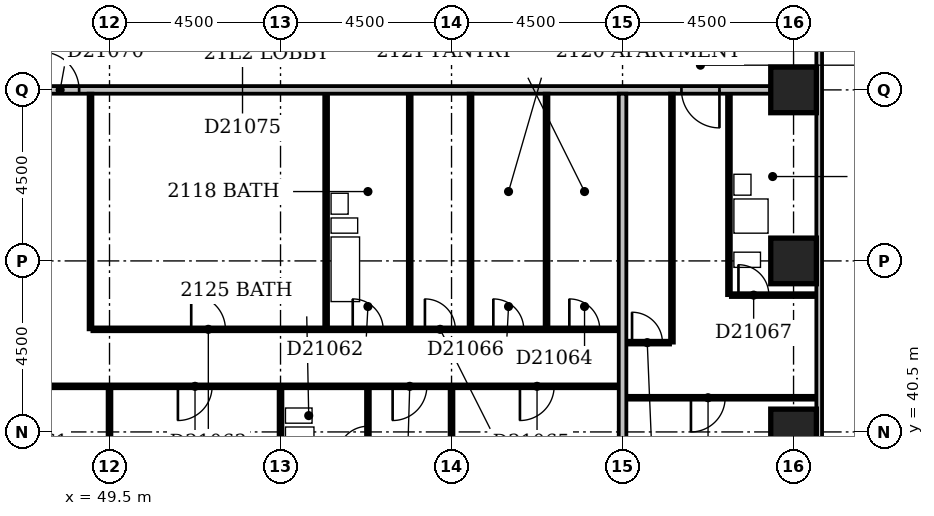
"""IFC4 building model, lengths in metres.
Left out: names, types, materials, properties, quantities, classifications, styles, units other than length and angle.
Written with IfcOpenShell. Run it as: python <this file> out.ifc"""

import sys

from ifc_helpers import new_model, si_unit, direction, frame, frame_2d, origin, origin_2d, place, context, subcontext, project, spatial, rectangle, extrude, element, fill, save


model = new_model("IFC4")
c1 = context("Model", 3, precision=1e-05, world=origin(), true_north=direction((0.0, 1.0)))
c2 = subcontext(c1, "Body", "Model", "MODEL_VIEW")
j1 = project(units=[si_unit("LENGTHUNIT", "METRE"), si_unit("PLANEANGLEUNIT", "RADIAN")], contexts=[c1])
p1 = place(None, origin())
s1 = spatial("IfcSite", under=j1, at=p1, CompositionType="ELEMENT")
p2 = place(p1, origin())
s2 = spatial("IfcBuilding", under=s1, at=p2, CompositionType="ELEMENT")
p3 = place(p2, frame((0.0, 0.0, 86.6)))
s3 = spatial("IfcBuildingStorey", under=s2, at=p3, CompositionType="ELEMENT", Elevation=86.6)
for number, where, z_axis, x_axis in (
    (1, (67.5, 40.5, -0.3), (0.0, 0.0, 1.0), (1.0, 0.0, 0.0)),
    (2, (67.5, 45.0, -0.3), (0.0, 0.0, 1.0), (1.0, 0.0, 0.0)),
    (3, (67.5, 49.5, -0.3), (0.0, 0.0, 1.0), (1.0, 0.0, 0.0)),
):
    element("IfcColumn", number, at=place(p3, frame(where, z_axis=z_axis, x_axis=x_axis)), inside=s3, PredefinedType="COLUMN", context=c2, shape_type="SweptSolid", body=[
        extrude(rectangle(XDim=1.2, YDim=1.2, at=origin_2d()), origin(), (0.0, 0.0, 1.0), 3.6),
    ])
p4 = place(p3, frame((68.175, 35.4, 0.0), z_axis=(0.0, 0.0, 1.0), x_axis=(0.0, 1.0, 0.0)))
e4 = element("IfcWall", 4, at=p4, inside=s3, PredefinedType="STANDARD", context=c2, shape_type="SweptSolid", body=[
    extrude(rectangle(XDim=23.85, YDim=0.15, at=frame_2d((11.925, 0.0))), origin(), (0.0, 0.0, 1.0), 2.7),
])
p5 = place(p4, frame((1.403, 0.0, 0.6)))
e5 = element("IfcOpeningElement", 5, at=p5, cuts=e4, PredefinedType="OPENING", context=c2, shape_type="SweptSolid", body=[
    extrude(rectangle(XDim=1.5, YDim=1.8, at=frame_2d((0.75, 0.9))), frame((0.0, 0.087, 0.0), z_axis=(0.0, -1.0, 0.0), x_axis=(1.0, 0.0, 0.0)), (0.0, 0.0, 1.0), 0.174),
])
p6 = place(p3, frame((49.5, 36.6, 0.0), z_axis=(0.0, 0.0, 1.0), x_axis=(0.0, 1.0, 0.0)))
e6 = element("IfcWall", 6, at=p6, inside=s3, PredefinedType="PARTITIONING", context=c2, shape_type="SweptSolid", body=[
    extrude(rectangle(XDim=5.05, YDim=0.1, at=frame_2d((2.525, 0.0))), origin(), (0.0, 0.0, 1.0), 3.3),
])
p7 = place(p3, frame((54.0, 36.6, 0.0), z_axis=(0.0, 0.0, 1.0), x_axis=(0.0, 1.0, 0.0)))
e7 = element("IfcWall", 7, at=p7, inside=s3, PredefinedType="PARTITIONING", context=c2, shape_type="SweptSolid", body=[
    extrude(rectangle(XDim=5.05, YDim=0.1, at=frame_2d((2.525, 0.0))), origin(), (0.0, 0.0, 1.0), 2.6),
])
p8 = place(p3, frame((58.5, 36.6, 0.0), z_axis=(0.0, 0.0, 1.0), x_axis=(0.0, 1.0, 0.0)))
e8 = element("IfcWall", 8, at=p8, inside=s3, PredefinedType="PARTITIONING", context=c2, shape_type="SweptSolid", body=[
    extrude(rectangle(XDim=5.05, YDim=0.1, at=frame_2d((2.525, 0.0))), origin(), (0.0, 0.0, 1.0), 3.3),
])
p9 = place(p3, frame((63.0, 36.6, 0.0), z_axis=(0.0, 0.0, 1.0), x_axis=(0.0, 1.0, 0.0)))
e9 = element("IfcWall", 9, at=p9, inside=s3, PredefinedType="PARTITIONING", context=c2, shape_type="SweptSolid", body=[
    extrude(rectangle(XDim=12.8, YDim=0.2, at=frame_2d((6.4, 0.0))), origin(), (0.0, 0.0, 1.0), 2.4),
])
p10 = place(p3, frame((56.3, 38.8, 0.0), z_axis=(0.0, 0.0, 1.0), x_axis=(0.0, 1.0, 0.0)))
e10 = element("IfcWall", 10, at=p10, inside=s3, PredefinedType="PLUMBINGWALL", context=c2, shape_type="SweptSolid", body=[
    extrude(rectangle(XDim=2.85, YDim=0.1, at=frame_2d((1.425, 0.0))), origin(), (0.0, 0.0, 1.0), 3.3),
])
p11 = place(p10, frame((1.05, 0.0, 0.0)))
e11 = element("IfcOpeningElement", 11, at=p11, cuts=e10, PredefinedType="OPENING", context=c2, shape_type="SweptSolid", body=[
    extrude(rectangle(XDim=0.8, YDim=2.1, at=frame_2d((0.4, 1.05))), frame((0.0, 0.062, 0.0), z_axis=(0.0, -1.0, 0.0), x_axis=(1.0, 0.0, 0.0)), (0.0, 0.0, 1.0), 0.124),
])
p12 = place(p3, frame((63.1, 41.4, 0.0), z_axis=(0.0, 0.0, 1.0), x_axis=(1.0, 0.0, 0.0)))
e12 = element("IfcWall", 12, at=p12, inside=s3, PredefinedType="PARTITIONING", context=c2, shape_type="SweptSolid", body=[
    extrude(rectangle(XDim=5.0, YDim=0.1, at=frame_2d((2.5, 0.0))), origin(), (0.0, 0.0, 1.0), 3.3),
])
p13 = place(p12, frame((1.7, 0.0, 0.0)))
e13 = element("IfcOpeningElement", 13, at=p13, cuts=e12, PredefinedType="OPENING", context=c2, shape_type="SweptSolid", body=[
    extrude(rectangle(XDim=0.9, YDim=2.1, at=frame_2d((0.45, 1.05))), frame((0.0, 0.062, 0.0), z_axis=(0.0, -1.0, 0.0), x_axis=(1.0, 0.0, 0.0)), (0.0, 0.0, 1.0), 0.124),
])
p14 = place(p3, frame((45.1, 41.7, 0.0), z_axis=(0.0, 0.0, 1.0), x_axis=(1.0, 0.0, 0.0)))
e14 = element("IfcWall", 14, at=p14, inside=s3, PredefinedType="PARTITIONING", context=c2, shape_type="SweptSolid", body=[
    extrude(rectangle(XDim=17.8, YDim=0.1, at=frame_2d((8.9, 0.0))), origin(), (0.0, 0.0, 1.0), 3.3),
])
p15 = place(p14, frame((1.7, 0.0, 0.0)))
e15 = element("IfcOpeningElement", 15, at=p15, cuts=e14, PredefinedType="OPENING", context=c2, shape_type="SweptSolid", body=[
    extrude(rectangle(XDim=0.9, YDim=2.1, at=frame_2d((0.45, 1.05))), frame((0.0, 0.062, 0.0), z_axis=(0.0, -1.0, 0.0), x_axis=(1.0, 0.0, 0.0)), (0.0, 0.0, 1.0), 0.124),
])
p16 = place(p14, frame((6.2, 0.0, 0.0)))
e16 = element("IfcOpeningElement", 16, at=p16, cuts=e14, PredefinedType="OPENING", context=c2, shape_type="SweptSolid", body=[
    extrude(rectangle(XDim=0.9, YDim=2.1, at=frame_2d((0.45, 1.05))), frame((0.0, 0.062, 0.0), z_axis=(0.0, -1.0, 0.0), x_axis=(1.0, 0.0, 0.0)), (0.0, 0.0, 1.0), 0.124),
])
p17 = place(p14, frame((11.85, 0.0, 0.0)))
e17 = element("IfcOpeningElement", 17, at=p17, cuts=e14, PredefinedType="OPENING", context=c2, shape_type="SweptSolid", body=[
    extrude(rectangle(XDim=0.9, YDim=2.1, at=frame_2d((0.45, 1.05))), frame((0.0, 0.062, 0.0), z_axis=(0.0, -1.0, 0.0), x_axis=(1.0, 0.0, 0.0)), (0.0, 0.0, 1.0), 0.124),
])
p18 = place(p14, frame((15.2, 0.0, 0.0)))
e18 = element("IfcOpeningElement", 18, at=p18, cuts=e14, PredefinedType="OPENING", context=c2, shape_type="SweptSolid", body=[
    extrude(rectangle(XDim=0.9, YDim=2.1, at=frame_2d((0.45, 1.05))), frame((0.0, 0.062, 0.0), z_axis=(0.0, -1.0, 0.0), x_axis=(1.0, 0.0, 0.0)), (0.0, 0.0, 1.0), 0.124),
])
p19 = place(p3, frame((63.1, 42.85, 0.0), z_axis=(0.0, 0.0, 1.0), x_axis=(1.0, 0.0, 0.0)))
e19 = element("IfcWall", 19, at=p19, inside=s3, PredefinedType="PARTITIONING", context=c2, shape_type="SweptSolid", body=[
    extrude(rectangle(XDim=1.15, YDim=0.1, at=frame_2d((0.575, 0.0))), origin(), (0.0, 0.0, 1.0), 3.3),
])
p20 = place(p19, frame((0.15, 0.0, 0.0)))
e20 = element("IfcOpeningElement", 20, at=p20, cuts=e19, PredefinedType="OPENING", context=c2, shape_type="SweptSolid", body=[
    extrude(rectangle(XDim=0.8, YDim=2.1, at=frame_2d((0.4, 1.05))), frame((0.0, 0.062, 0.0), z_axis=(0.0, -1.0, 0.0), x_axis=(1.0, 0.0, 0.0)), (0.0, 0.0, 1.0), 0.124),
])
p21 = place(p3, frame((64.3, 42.85, 0.0), z_axis=(0.0, 0.0, 1.0), x_axis=(0.0, 1.0, 0.0)))
e21 = element("IfcWall", 21, at=p21, inside=s3, PredefinedType="PARTITIONING", context=c2, shape_type="SweptSolid", body=[
    extrude(rectangle(XDim=6.55, YDim=0.1, at=frame_2d((3.275, 0.0))), origin(), (0.0, 0.0, 1.0), 3.3),
])
p22 = place(p3, frame((49.0, 43.2, 0.0), z_axis=(0.0, 0.0, 1.0), x_axis=(0.0, 1.0, 0.0)))
e22 = element("IfcWall", 22, at=p22, inside=s3, PredefinedType="PARTITIONING", context=c2, shape_type="SweptSolid", body=[
    extrude(rectangle(XDim=6.2, YDim=0.1, at=frame_2d((3.1, 0.0))), origin(), (0.0, 0.0, 1.0), 3.3),
])
p23 = place(p3, frame((49.05, 43.2, 0.0), z_axis=(0.0, 0.0, 1.0), x_axis=(1.0, 0.0, 0.0)))
e23 = element("IfcWall", 23, at=p23, inside=s3, PredefinedType="PARTITIONING", context=c2, shape_type="SweptSolid", body=[
    extrude(rectangle(XDim=13.85, YDim=0.1, at=frame_2d((6.925, 0.0))), origin(), (0.0, 0.0, 1.0), 3.3),
])
p24 = place(p23, frame((6.85, 0.0, 0.0)))
e24 = element("IfcOpeningElement", 24, at=p24, cuts=e23, PredefinedType="OPENING", context=c2, shape_type="SweptSolid", body=[
    extrude(rectangle(XDim=0.8, YDim=2.1, at=frame_2d((0.4, 1.05))), frame((0.0, 0.062, 0.0), z_axis=(0.0, -1.0, 0.0), x_axis=(1.0, 0.0, 0.0)), (0.0, 0.0, 1.0), 0.124),
])
p25 = place(p23, frame((2.6, 0.0, 0.0)))
e25 = element("IfcOpeningElement", 25, at=p25, cuts=e23, PredefinedType="OPENING", context=c2, shape_type="SweptSolid", body=[
    extrude(rectangle(XDim=0.9, YDim=2.1, at=frame_2d((0.45, 1.05))), frame((0.0, 0.062, 0.0), z_axis=(0.0, -1.0, 0.0), x_axis=(1.0, 0.0, 0.0)), (0.0, 0.0, 1.0), 0.124),
])
p26 = place(p23, frame((12.55, 0.0, 0.0)))
e26 = element("IfcOpeningElement", 26, at=p26, cuts=e23, PredefinedType="OPENING", context=c2, shape_type="SweptSolid", body=[
    extrude(rectangle(XDim=0.8, YDim=2.1, at=frame_2d((0.4, 1.05))), frame((0.0, 0.062, 0.0), z_axis=(0.0, -1.0, 0.0), x_axis=(1.0, 0.0, 0.0)), (0.0, 0.0, 1.0), 0.124),
])
p27 = place(p23, frame((8.75, 0.0, 0.0)))
e27 = element("IfcOpeningElement", 27, at=p27, cuts=e23, PredefinedType="OPENING", context=c2, shape_type="SweptSolid", body=[
    extrude(rectangle(XDim=0.8, YDim=2.1, at=frame_2d((0.4, 1.05))), frame((0.0, 0.062, 0.0), z_axis=(0.0, -1.0, 0.0), x_axis=(1.0, 0.0, 0.0)), (0.0, 0.0, 1.0), 0.124),
])
p28 = place(p23, frame((10.55, 0.0, 0.0)))
e28 = element("IfcOpeningElement", 28, at=p28, cuts=e23, PredefinedType="OPENING", context=c2, shape_type="SweptSolid", body=[
    extrude(rectangle(XDim=0.8, YDim=2.1, at=frame_2d((0.4, 1.05))), frame((0.0, 0.062, 0.0), z_axis=(0.0, -1.0, 0.0), x_axis=(1.0, 0.0, 0.0)), (0.0, 0.0, 1.0), 0.124),
])
for number, where, z_axis, x_axis in (
    (29, (55.2, 43.25, 0.0), (0.0, 0.0, 1.0), (0.0, 1.0, 0.0)),
    (30, (57.4, 43.25, 0.0), (0.0, 0.0, 1.0), (0.0, 1.0, 0.0)),
):
    element("IfcWall", number, at=place(p3, frame(where, z_axis=z_axis, x_axis=x_axis)), inside=s3, PredefinedType="PLUMBINGWALL", context=c2, shape_type="SweptSolid", body=[
        extrude(rectangle(XDim=6.15, YDim=0.1, at=frame_2d((3.075, 0.0))), origin(), (0.0, 0.0, 1.0), 3.3),
    ])
for number, where, z_axis, x_axis in (
    (31, (59.0, 43.25, 0.0), (0.0, 0.0, 1.0), (0.0, 1.0, 0.0)),
    (32, (61.0, 43.25, 0.0), (0.0, 0.0, 1.0), (0.0, 1.0, 0.0)),
):
    element("IfcWall", number, at=place(p3, frame(where, z_axis=z_axis, x_axis=x_axis)), inside=s3, PredefinedType="PARTITIONING", context=c2, shape_type="SweptSolid", body=[
        extrude(rectangle(XDim=6.15, YDim=0.1, at=frame_2d((3.075, 0.0))), origin(), (0.0, 0.0, 1.0), 3.3),
    ])
p29 = place(p3, frame((65.8, 44.1, 0.0), z_axis=(0.0, 0.0, 1.0), x_axis=(0.0, 1.0, 0.0)))
e33 = element("IfcWall", 33, at=p29, inside=s3, PredefinedType="PLUMBINGWALL", context=c2, shape_type="SweptSolid", body=[
    extrude(rectangle(XDim=5.3, YDim=0.1, at=frame_2d((2.65, 0.0))), origin(), (0.0, 0.0, 1.0), 3.3),
])
p30 = place(p3, frame((65.85, 44.1, 0.0), z_axis=(0.0, 0.0, 1.0), x_axis=(1.0, 0.0, 0.0)))
e34 = element("IfcWall", 34, at=p30, inside=s3, PredefinedType="PARTITIONING", context=c2, shape_type="SweptSolid", body=[
    extrude(rectangle(XDim=2.25, YDim=0.1, at=frame_2d((1.125, 0.0))), origin(), (0.0, 0.0, 1.0), 3.3),
])
p31 = place(p30, frame((0.2, 0.0, 0.0)))
e35 = element("IfcOpeningElement", 35, at=p31, cuts=e34, PredefinedType="OPENING", context=c2, shape_type="SweptSolid", body=[
    extrude(rectangle(XDim=0.8, YDim=2.1, at=frame_2d((0.4, 1.05))), frame((0.0, 0.062, 0.0), z_axis=(0.0, -1.0, 0.0), x_axis=(1.0, 0.0, 0.0)), (0.0, 0.0, 1.0), 0.124),
])
p32 = place(p3, frame((9.1, 49.5, 0.0), z_axis=(0.0, 0.0, 1.0), x_axis=(1.0, 0.0, 0.0)))
e36 = element("IfcWall", 36, at=p32, inside=s3, PredefinedType="PARTITIONING", context=c2, shape_type="SweptSolid", body=[
    extrude(rectangle(XDim=57.8, YDim=0.2, at=frame_2d((28.9, 0.0))), origin(), (0.0, 0.0, 1.0), 3.3),
])
p33 = place(p32, frame((13.7, 0.0, 0.0)))
e37 = element("IfcOpeningElement", 37, at=p33, cuts=e36, PredefinedType="OPENING", context=c2, shape_type="SweptSolid", body=[
    extrude(rectangle(XDim=1.0, YDim=2.1, at=frame_2d((0.5, 1.05))), frame((0.0, 0.112, 0.0), z_axis=(0.0, -1.0, 0.0), x_axis=(1.0, 0.0, 0.0)), (0.0, 0.0, 1.0), 0.224),
])
p34 = place(p32, frame((22.7, 0.0, 0.0)))
e38 = element("IfcOpeningElement", 38, at=p34, cuts=e36, PredefinedType="OPENING", context=c2, shape_type="SweptSolid", body=[
    extrude(rectangle(XDim=1.0, YDim=2.1, at=frame_2d((0.5, 1.05))), frame((0.0, 0.112, 0.0), z_axis=(0.0, -1.0, 0.0), x_axis=(1.0, 0.0, 0.0)), (0.0, 0.0, 1.0), 0.224),
])
p35 = place(p32, frame((38.6, 0.0, 0.0)))
e39 = element("IfcOpeningElement", 39, at=p35, cuts=e36, PredefinedType="OPENING", context=c2, shape_type="SweptSolid", body=[
    extrude(rectangle(XDim=1.0, YDim=2.1, at=frame_2d((0.5, 1.05))), frame((0.0, 0.112, 0.0), z_axis=(0.0, -1.0, 0.0), x_axis=(1.0, 0.0, 0.0)), (0.0, 0.0, 1.0), 0.224),
])
p36 = place(p32, frame((55.45, 0.0, 0.0)))
e40 = element("IfcOpeningElement", 40, at=p36, cuts=e36, PredefinedType="OPENING", context=c2, shape_type="SweptSolid", body=[
    extrude(rectangle(XDim=1.0, YDim=2.1, at=frame_2d((0.5, 1.05))), frame((0.0, 0.112, 0.0), z_axis=(0.0, -1.0, 0.0), x_axis=(1.0, 0.0, 0.0)), (0.0, 0.0, 1.0), 0.224),
])
p37 = place(p32, frame((6.15, 0.0, 0.0)))
e41 = element("IfcOpeningElement", 41, at=p37, cuts=e36, PredefinedType="OPENING", context=c2, shape_type="SweptSolid", body=[
    extrude(rectangle(XDim=0.9, YDim=2.1, at=frame_2d((0.45, 1.05))), frame((0.0, 0.112, 0.0), z_axis=(0.0, -1.0, 0.0), x_axis=(1.0, 0.0, 0.0)), (0.0, 0.0, 1.0), 0.224),
])
p38 = place(p11, origin())
e42 = element("IfcDoor", 42, at=p38, inside=s3, OperationType="SINGLE_SWING_LEFT", PredefinedType="DOOR", context=c2, shape_type="SweptSolid", body=[
    extrude(rectangle(XDim=0.8, YDim=2.1, at=frame_2d((0.4, 1.05))), frame((0.0, 0.025, 0.0), z_axis=(0.0, -1.0, 0.0), x_axis=(1.0, 0.0, 0.0)), (0.0, 0.0, 1.0), 0.05),
])
fill(e11, e42)
p39 = place(p13, frame((0.9, 0.0, 0.0), z_axis=(0.0, 0.0, 1.0), x_axis=(-1.0, 0.0, 0.0)))
e43 = element("IfcDoor", 43, at=p39, inside=s3, OperationType="SINGLE_SWING_RIGHT", PredefinedType="DOOR", context=c2, shape_type="SweptSolid", body=[
    extrude(rectangle(XDim=0.9, YDim=2.1, at=frame_2d((0.45, 1.05))), frame((0.0, 0.025, 0.0), z_axis=(0.0, -1.0, 0.0), x_axis=(1.0, 0.0, 0.0)), (0.0, 0.0, 1.0), 0.05),
])
fill(e13, e43)
p40 = place(p16, frame((0.9, 0.0, 0.0), z_axis=(0.0, 0.0, 1.0), x_axis=(-1.0, 0.0, 0.0)))
e44 = element("IfcDoor", 44, at=p40, inside=s3, OperationType="SINGLE_SWING_RIGHT", PredefinedType="DOOR", context=c2, shape_type="SweptSolid", body=[
    extrude(rectangle(XDim=0.9, YDim=2.1, at=frame_2d((0.45, 1.05))), frame((0.0, 0.025, 0.0), z_axis=(0.0, -1.0, 0.0), x_axis=(1.0, 0.0, 0.0)), (0.0, 0.0, 1.0), 0.05),
])
fill(e16, e44)
p41 = place(p17, frame((0.9, 0.0, 0.0), z_axis=(0.0, 0.0, 1.0), x_axis=(-1.0, 0.0, 0.0)))
e45 = element("IfcDoor", 45, at=p41, inside=s3, OperationType="SINGLE_SWING_RIGHT", PredefinedType="DOOR", context=c2, shape_type="SweptSolid", body=[
    extrude(rectangle(XDim=0.9, YDim=2.1, at=frame_2d((0.45, 1.05))), frame((0.0, 0.025, 0.0), z_axis=(0.0, -1.0, 0.0), x_axis=(1.0, 0.0, 0.0)), (0.0, 0.0, 1.0), 0.05),
])
fill(e17, e45)
p42 = place(p18, frame((0.9, 0.0, 0.0), z_axis=(0.0, 0.0, 1.0), x_axis=(-1.0, 0.0, 0.0)))
e46 = element("IfcDoor", 46, at=p42, inside=s3, OperationType="SINGLE_SWING_RIGHT", PredefinedType="DOOR", context=c2, shape_type="SweptSolid", body=[
    extrude(rectangle(XDim=0.9, YDim=2.1, at=frame_2d((0.45, 1.05))), frame((0.0, 0.025, 0.0), z_axis=(0.0, -1.0, 0.0), x_axis=(1.0, 0.0, 0.0)), (0.0, 0.0, 1.0), 0.05),
])
fill(e18, e46)
p43 = place(p20, origin())
e47 = element("IfcDoor", 47, at=p43, inside=s3, OperationType="SINGLE_SWING_LEFT", PredefinedType="DOOR", context=c2, shape_type="SweptSolid", body=[
    extrude(rectangle(XDim=0.8, YDim=2.1, at=frame_2d((0.4, 1.05))), frame((0.0, 0.025, 0.0), z_axis=(0.0, -1.0, 0.0), x_axis=(1.0, 0.0, 0.0)), (0.0, 0.0, 1.0), 0.05),
])
fill(e20, e47)
p44 = place(p24, origin())
e48 = element("IfcDoor", 48, at=p44, inside=s3, OperationType="SINGLE_SWING_LEFT", PredefinedType="DOOR", context=c2, shape_type="SweptSolid", body=[
    extrude(rectangle(XDim=0.8, YDim=2.1, at=frame_2d((0.4, 1.05))), frame((0.0, 0.025, 0.0), z_axis=(0.0, -1.0, 0.0), x_axis=(1.0, 0.0, 0.0)), (0.0, 0.0, 1.0), 0.05),
])
fill(e24, e48)
p45 = place(p25, origin())
e49 = element("IfcDoor", 49, at=p45, inside=s3, OperationType="SINGLE_SWING_LEFT", PredefinedType="DOOR", context=c2, shape_type="SweptSolid", body=[
    extrude(rectangle(XDim=0.9, YDim=2.1, at=frame_2d((0.45, 1.05))), frame((0.0, 0.025, 0.0), z_axis=(0.0, -1.0, 0.0), x_axis=(1.0, 0.0, 0.0)), (0.0, 0.0, 1.0), 0.05),
])
fill(e25, e49)
p46 = place(p26, origin())
e50 = element("IfcDoor", 50, at=p46, inside=s3, OperationType="SINGLE_SWING_LEFT", PredefinedType="DOOR", context=c2, shape_type="SweptSolid", body=[
    extrude(rectangle(XDim=0.8, YDim=2.1, at=frame_2d((0.4, 1.05))), frame((0.0, 0.025, 0.0), z_axis=(0.0, -1.0, 0.0), x_axis=(1.0, 0.0, 0.0)), (0.0, 0.0, 1.0), 0.05),
])
fill(e26, e50)
p47 = place(p27, origin())
e51 = element("IfcDoor", 51, at=p47, inside=s3, OperationType="SINGLE_SWING_LEFT", PredefinedType="DOOR", context=c2, shape_type="SweptSolid", body=[
    extrude(rectangle(XDim=0.8, YDim=2.1, at=frame_2d((0.4, 1.05))), frame((0.0, 0.025, 0.0), z_axis=(0.0, -1.0, 0.0), x_axis=(1.0, 0.0, 0.0)), (0.0, 0.0, 1.0), 0.05),
])
fill(e27, e51)
p48 = place(p28, origin())
e52 = element("IfcDoor", 52, at=p48, inside=s3, OperationType="SINGLE_SWING_LEFT", PredefinedType="DOOR", context=c2, shape_type="SweptSolid", body=[
    extrude(rectangle(XDim=0.8, YDim=2.1, at=frame_2d((0.4, 1.05))), frame((0.0, 0.025, 0.0), z_axis=(0.0, -1.0, 0.0), x_axis=(1.0, 0.0, 0.0)), (0.0, 0.0, 1.0), 0.05),
])
fill(e28, e52)
p49 = place(p31, origin())
e53 = element("IfcDoor", 53, at=p49, inside=s3, OperationType="SINGLE_SWING_LEFT", PredefinedType="DOOR", context=c2, shape_type="SweptSolid", body=[
    extrude(rectangle(XDim=0.8, YDim=2.1, at=frame_2d((0.4, 1.05))), frame((0.0, 0.025, 0.0), z_axis=(0.0, -1.0, 0.0), x_axis=(1.0, 0.0, 0.0)), (0.0, 0.0, 1.0), 0.05),
])
fill(e35, e53)
p50 = place(p35, origin())
e54 = element("IfcDoor", 54, at=p50, inside=s3, OperationType="SINGLE_SWING_LEFT", PredefinedType="DOOR", context=c2, shape_type="SweptSolid", body=[
    extrude(rectangle(XDim=1.0, YDim=2.1, at=frame_2d((0.5, 1.05))), frame((0.0, 0.025, 0.0), z_axis=(0.0, -1.0, 0.0), x_axis=(1.0, 0.0, 0.0)), (0.0, 0.0, 1.0), 0.05),
])
fill(e39, e54)
p51 = place(p36, origin())
e55 = element("IfcDoor", 55, at=p51, inside=s3, OperationType="SINGLE_SWING_RIGHT", PredefinedType="DOOR", context=c2, shape_type="SweptSolid", body=[
    extrude(rectangle(XDim=1.0, YDim=2.1, at=frame_2d((0.5, 1.05))), frame((0.0, 0.025, 0.0), z_axis=(0.0, -1.0, 0.0), x_axis=(1.0, 0.0, 0.0)), (0.0, 0.0, 1.0), 0.05),
])
fill(e40, e55)
save(model, sys.argv[1])
